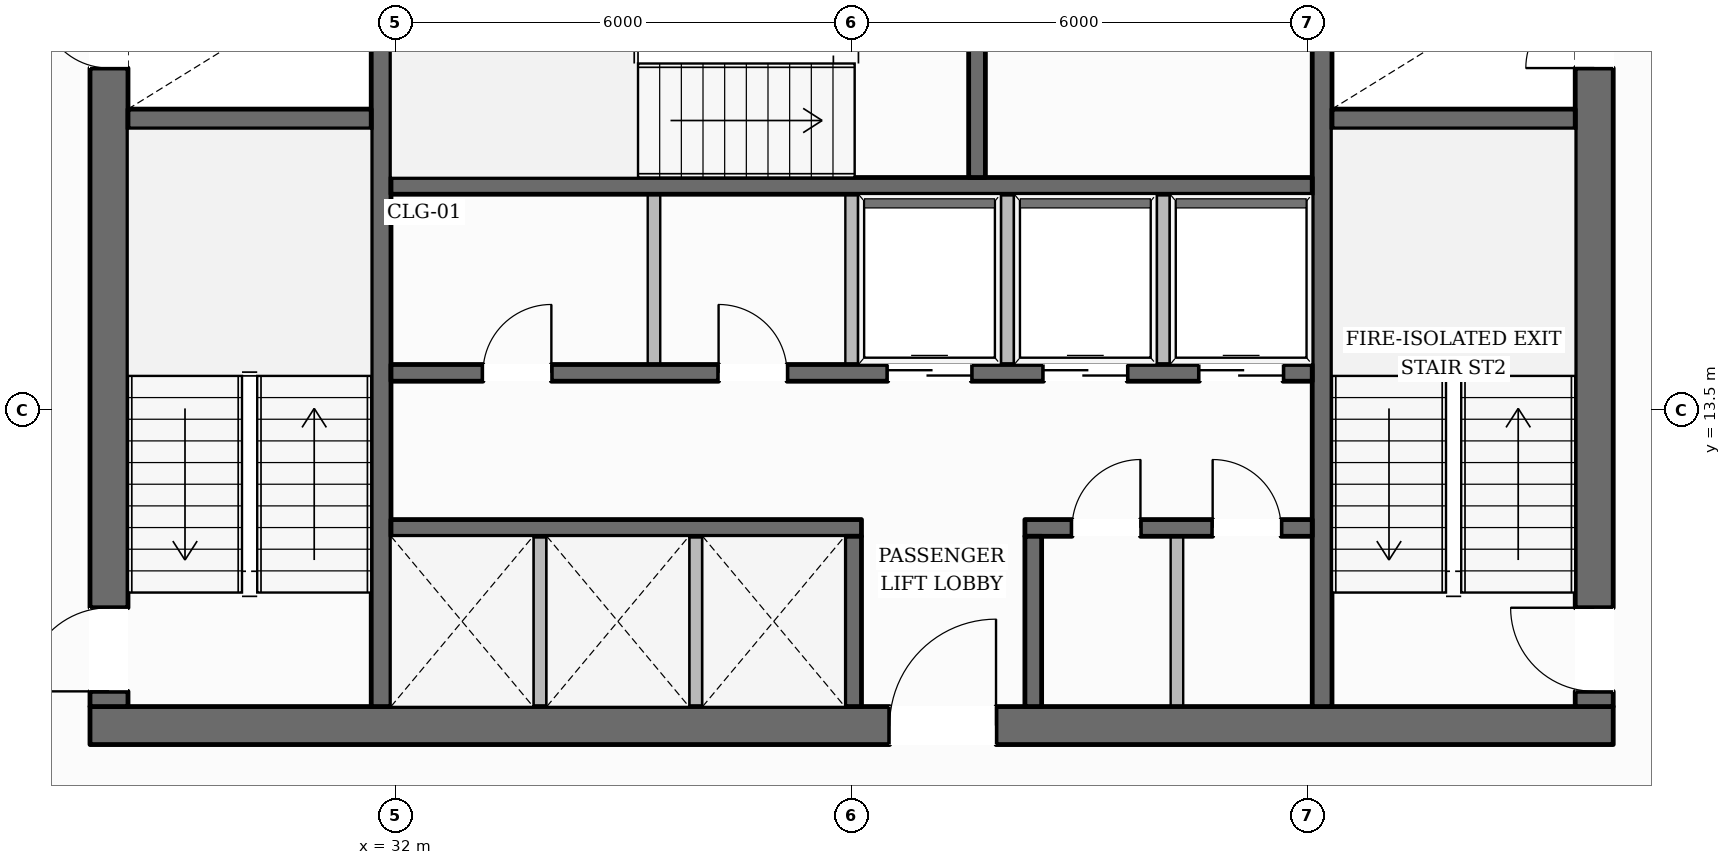
"""IFC4 building model, lengths in metres.
Left out: names, types, materials, properties, quantities, classifications, styles, units other than length and angle.
Written with IfcOpenShell. Run it as: python <this file> out.ifc"""

import sys

from ifc_helpers import new_model, si_unit, direction, frame, frame_2d, origin, place, context, subcontext, project, spatial, rectangle, extrude, element, fill, save


model = new_model("IFC4")
c1 = context("Model", 3, precision=1e-05, world=origin(), true_north=direction((0.0, 1.0)))
c2 = subcontext(c1, "Body", "Model", "MODEL_VIEW")
j1 = project(units=[si_unit("LENGTHUNIT", "METRE"), si_unit("PLANEANGLEUNIT", "RADIAN")], contexts=[c1])
p1 = place(None, origin())
s1 = spatial("IfcSite", under=j1, at=p1, CompositionType="ELEMENT")
p2 = place(p1, origin())
s2 = spatial("IfcBuilding", under=s1, at=p2, CompositionType="ELEMENT")
p3 = place(p2, frame((0.0, 0.0, 124.0)))
s3 = spatial("IfcBuildingStorey", under=s2, at=p3, CompositionType="ELEMENT", Elevation=124.0)
p4 = place(p3, frame((27.98, 9.35, 0.0), z_axis=(0.0, 0.0, 1.0), x_axis=(1.0, 0.0, 0.0)))
e1 = element("IfcWall", 1, at=p4, inside=s3, PredefinedType="SOLIDWALL", context=c2, shape_type="SweptSolid", body=[
    extrude(rectangle(XDim=20.04, YDim=0.5, at=frame_2d((10.02, 0.0))), origin(), (0.0, 0.0, 1.0), 3.6),
])
p5 = place(p4, frame((10.52, 0.0, 0.0)))
e2 = element("IfcOpeningElement", 2, at=p5, cuts=e1, PredefinedType="OPENING", context=c2, shape_type="SweptSolid", body=[
    extrude(rectangle(XDim=1.4, YDim=2.2, at=frame_2d((0.7, 1.1))), frame((0.0, 0.26, 0.0), z_axis=(0.0, -1.0, 0.0), x_axis=(1.0, 0.0, 0.0)), (0.0, 0.0, 1.0), 0.52),
])
p6 = place(p3, frame((28.23, 9.6, 0.0), z_axis=(0.0, 0.0, 1.0), x_axis=(0.0, 1.0, 0.0)))
e3 = element("IfcWall", 3, at=p6, inside=s3, PredefinedType="SOLIDWALL", context=c2, shape_type="SweptSolid", body=[
    extrude(rectangle(XDim=13.0, YDim=0.5, at=frame_2d((6.5, 0.0))), origin(), (0.0, 0.0, 1.0), 3.6),
])
p7 = place(p6, frame((0.2, 0.0, 0.0)))
e4 = element("IfcOpeningElement", 4, at=p7, cuts=e3, PredefinedType="OPENING", context=c2, shape_type="SweptSolid", body=[
    extrude(rectangle(XDim=1.1, YDim=2.15, at=frame_2d((0.55, 1.075))), frame((0.0, 0.26, 0.0), z_axis=(0.0, -1.0, 0.0), x_axis=(1.0, 0.0, 0.0)), (0.0, 0.0, 1.0), 0.52),
])
p8 = place(p6, frame((8.4, 0.0, 0.0)))
e5 = element("IfcOpeningElement", 5, at=p8, cuts=e3, PredefinedType="OPENING", context=c2, shape_type="SweptSolid", body=[
    extrude(rectangle(XDim=0.9, YDim=2.1, at=frame_2d((0.45, 1.05))), frame((0.0, 0.26, 0.0), z_axis=(0.0, -1.0, 0.0), x_axis=(1.0, 0.0, 0.0)), (0.0, 0.0, 1.0), 0.52),
])
p9 = place(p3, frame((47.77, 9.6, 0.0), z_axis=(0.0, 0.0, 1.0), x_axis=(0.0, 1.0, 0.0)))
e6 = element("IfcWall", 6, at=p9, inside=s3, PredefinedType="SOLIDWALL", context=c2, shape_type="SweptSolid", body=[
    extrude(rectangle(XDim=13.0, YDim=0.5, at=frame_2d((6.5, 0.0))), origin(), (0.0, 0.0, 1.0), 3.6),
])
p10 = place(p9, frame((0.2, 0.0, 0.0)))
e7 = element("IfcOpeningElement", 7, at=p10, cuts=e6, PredefinedType="OPENING", context=c2, shape_type="SweptSolid", body=[
    extrude(rectangle(XDim=1.1, YDim=2.15, at=frame_2d((0.55, 1.075))), frame((0.0, 0.26, 0.0), z_axis=(0.0, -1.0, 0.0), x_axis=(1.0, 0.0, 0.0)), (0.0, 0.0, 1.0), 0.52),
])
p11 = place(p9, frame((8.4, 0.0, 0.0)))
e8 = element("IfcOpeningElement", 8, at=p11, cuts=e6, PredefinedType="OPENING", context=c2, shape_type="SweptSolid", body=[
    extrude(rectangle(XDim=0.9, YDim=2.1, at=frame_2d((0.45, 1.05))), frame((0.0, 0.26, 0.0), z_axis=(0.0, -1.0, 0.0), x_axis=(1.0, 0.0, 0.0)), (0.0, 0.0, 1.0), 0.52),
])
p12 = place(p3, frame((31.81, 9.6, 0.0), z_axis=(0.0, 0.0, 1.0), x_axis=(0.0, 1.0, 0.0)))
e9 = element("IfcWall", 9, at=p12, inside=s3, PredefinedType="SHEAR", context=c2, shape_type="SweptSolid", body=[
    extrude(rectangle(XDim=13.0, YDim=0.26, at=frame_2d((6.5, 0.0))), origin(), (0.0, 0.0, 1.0), 3.6),
])
p13 = place(p12, frame((10.925, 0.0, 0.0)))
e10 = element("IfcOpeningElement", 10, at=p13, cuts=e9, PredefinedType="OPENING", context=c2, shape_type="SweptSolid", body=[
    extrude(rectangle(XDim=1.25, YDim=2.25, at=frame_2d((0.625, 1.125))), frame((0.0, 0.14, 0.0), z_axis=(0.0, -1.0, 0.0), x_axis=(1.0, 0.0, 0.0)), (0.0, 0.0, 1.0), 0.28),
])
p14 = place(p3, frame((44.19, 9.6, 0.0), z_axis=(0.0, 0.0, 1.0), x_axis=(0.0, 1.0, 0.0)))
e11 = element("IfcWall", 11, at=p14, inside=s3, PredefinedType="SHEAR", context=c2, shape_type="SweptSolid", body=[
    extrude(rectangle(XDim=13.0, YDim=0.26, at=frame_2d((6.5, 0.0))), origin(), (0.0, 0.0, 1.0), 3.6),
])
p15 = place(p14, frame((10.925, 0.0, 0.0)))
e12 = element("IfcOpeningElement", 12, at=p15, cuts=e11, PredefinedType="OPENING", context=c2, shape_type="SweptSolid", body=[
    extrude(rectangle(XDim=1.25, YDim=2.25, at=frame_2d((0.625, 1.125))), frame((0.0, 0.14, 0.0), z_axis=(0.0, -1.0, 0.0), x_axis=(1.0, 0.0, 0.0)), (0.0, 0.0, 1.0), 0.28),
])
for number, where, z_axis, x_axis in (
    (13, (28.48, 17.33, 0.0), (0.0, 0.0, 1.0), (1.0, 0.0, 0.0)),
    (14, (44.32, 17.33, 0.0), (0.0, 0.0, 1.0), (1.0, 0.0, 0.0)),
):
    element("IfcWall", number, at=place(p3, frame(where, z_axis=z_axis, x_axis=x_axis)), inside=s3, PredefinedType="SHEAR", context=c2, shape_type="SweptSolid", body=[
        extrude(rectangle(XDim=3.2, YDim=0.26, at=frame_2d((1.6, 0.0))), origin(), (0.0, 0.0, 1.0), 3.6),
    ])
p16 = place(p3, frame((31.94, 16.45, 0.0), z_axis=(0.0, 0.0, 1.0), x_axis=(1.0, 0.0, 0.0)))
e15 = element("IfcWall", 15, at=p16, inside=s3, PredefinedType="SOLIDWALL", context=c2, shape_type="SweptSolid", body=[
    extrude(rectangle(XDim=12.12, YDim=0.22, at=frame_2d((6.06, 0.0))), origin(), (0.0, 0.0, 1.0), 3.6),
])
p17 = place(p3, frame((39.65, 16.56, 0.0), z_axis=(0.0, 0.0, 1.0), x_axis=(0.0, 1.0, 0.0)))
e16 = element("IfcWall", 16, at=p17, inside=s3, PredefinedType="SOLIDWALL", context=c2, shape_type="SweptSolid", body=[
    extrude(rectangle(XDim=3.2, YDim=0.22, at=frame_2d((1.6, 0.0))), origin(), (0.0, 0.0, 1.0), 3.6),
])
p18 = place(p3, frame((31.94, 13.99, 0.0), z_axis=(0.0, 0.0, 1.0), x_axis=(1.0, 0.0, 0.0)))
e17 = element("IfcWall", 17, at=p18, inside=s3, PredefinedType="SOLIDWALL", context=c2, shape_type="SweptSolid", body=[
    extrude(rectangle(XDim=12.12, YDim=0.22, at=frame_2d((6.06, 0.0))), origin(), (0.0, 0.0, 1.0), 3.6),
])
p19 = place(p18, frame((1.21, 0.0, 0.0)))
e18 = element("IfcOpeningElement", 18, at=p19, cuts=e17, PredefinedType="OPENING", context=c2, shape_type="SweptSolid", body=[
    extrude(rectangle(XDim=0.9, YDim=2.1, at=frame_2d((0.45, 1.05))), frame((0.0, 0.12, 0.0), z_axis=(0.0, -1.0, 0.0), x_axis=(1.0, 0.0, 0.0)), (0.0, 0.0, 1.0), 0.24),
])
p20 = place(p18, frame((4.31, 0.0, 0.0)))
e19 = element("IfcOpeningElement", 19, at=p20, cuts=e17, PredefinedType="OPENING", context=c2, shape_type="SweptSolid", body=[
    extrude(rectangle(XDim=0.9, YDim=2.1, at=frame_2d((0.45, 1.05))), frame((0.0, 0.12, 0.0), z_axis=(0.0, -1.0, 0.0), x_axis=(1.0, 0.0, 0.0)), (0.0, 0.0, 1.0), 0.24),
])
p21 = place(p18, frame((6.535, 0.0, 0.0)))
e20 = element("IfcOpeningElement", 20, at=p21, cuts=e17, PredefinedType="OPENING", context=c2, shape_type="SweptSolid", body=[
    extrude(rectangle(XDim=1.1, YDim=2.2, at=frame_2d((0.55, 1.1))), frame((0.0, 0.12, 0.0), z_axis=(0.0, -1.0, 0.0), x_axis=(1.0, 0.0, 0.0)), (0.0, 0.0, 1.0), 0.24),
])
p22 = place(p18, frame((8.585, 0.0, 0.0)))
e21 = element("IfcOpeningElement", 21, at=p22, cuts=e17, PredefinedType="OPENING", context=c2, shape_type="SweptSolid", body=[
    extrude(rectangle(XDim=1.1, YDim=2.2, at=frame_2d((0.55, 1.1))), frame((0.0, 0.12, 0.0), z_axis=(0.0, -1.0, 0.0), x_axis=(1.0, 0.0, 0.0)), (0.0, 0.0, 1.0), 0.24),
])
p23 = place(p18, frame((10.635, 0.0, 0.0)))
e22 = element("IfcOpeningElement", 22, at=p23, cuts=e17, PredefinedType="OPENING", context=c2, shape_type="SweptSolid", body=[
    extrude(rectangle(XDim=1.1, YDim=2.2, at=frame_2d((0.55, 1.1))), frame((0.0, 0.12, 0.0), z_axis=(0.0, -1.0, 0.0), x_axis=(1.0, 0.0, 0.0)), (0.0, 0.0, 1.0), 0.24),
])
p24 = place(p3, frame((31.94, 11.95, 0.0), z_axis=(0.0, 0.0, 1.0), x_axis=(1.0, 0.0, 0.0)))
e23 = element("IfcWall", 23, at=p24, inside=s3, PredefinedType="SOLIDWALL", context=c2, shape_type="SweptSolid", body=[
    extrude(rectangle(XDim=6.19, YDim=0.22, at=frame_2d((3.095, 0.0))), origin(), (0.0, 0.0, 1.0), 3.6),
])
p25 = place(p3, frame((40.28, 11.95, 0.0), z_axis=(0.0, 0.0, 1.0), x_axis=(1.0, 0.0, 0.0)))
e24 = element("IfcWall", 24, at=p25, inside=s3, PredefinedType="SOLIDWALL", context=c2, shape_type="SweptSolid", body=[
    extrude(rectangle(XDim=3.78, YDim=0.22, at=frame_2d((1.89, 0.0))), origin(), (0.0, 0.0, 1.0), 3.6),
])
p26 = place(p25, frame((0.62, 0.0, 0.0)))
e25 = element("IfcOpeningElement", 25, at=p26, cuts=e24, PredefinedType="OPENING", context=c2, shape_type="SweptSolid", body=[
    extrude(rectangle(XDim=0.9, YDim=2.1, at=frame_2d((0.45, 1.05))), frame((0.0, 0.12, 0.0), z_axis=(0.0, -1.0, 0.0), x_axis=(1.0, 0.0, 0.0)), (0.0, 0.0, 1.0), 0.24),
])
p27 = place(p25, frame((2.47, 0.0, 0.0)))
e26 = element("IfcOpeningElement", 26, at=p27, cuts=e24, PredefinedType="OPENING", context=c2, shape_type="SweptSolid", body=[
    extrude(rectangle(XDim=0.9, YDim=2.1, at=frame_2d((0.45, 1.05))), frame((0.0, 0.12, 0.0), z_axis=(0.0, -1.0, 0.0), x_axis=(1.0, 0.0, 0.0)), (0.0, 0.0, 1.0), 0.24),
])
for number, where, z_axis, x_axis in (
    (27, (38.02, 9.6, 0.0), (0.0, 0.0, 1.0), (0.0, 1.0, 0.0)),
    (28, (40.39, 9.6, 0.0), (0.0, 0.0, 1.0), (0.0, 1.0, 0.0)),
):
    element("IfcWall", number, at=place(p3, frame(where, z_axis=z_axis, x_axis=x_axis)), inside=s3, PredefinedType="SOLIDWALL", context=c2, shape_type="SweptSolid", body=[
        extrude(rectangle(XDim=2.24, YDim=0.22, at=frame_2d((1.12, 0.0))), origin(), (0.0, 0.0, 1.0), 3.6),
    ])
p28 = place(p3, frame((13.815, 12.649, 0.0), z_axis=(0.0, 0.0, 1.0), x_axis=(0.501718288841, 0.865031073801, 0.0)))
e29 = element("IfcWall", 29, at=p28, inside=s3, PredefinedType="STANDARD", context=c2, shape_type="SweptSolid", body=[
    extrude(rectangle(XDim=36.708, YDim=0.38, at=frame_2d((18.354, 0.0))), origin(), (0.0, 0.0, 1.0), 3.059),
])
p29 = place(p28, frame((32.476, 0.0, 0.65)))
e30 = element("IfcOpeningElement", 30, at=p29, cuts=e29, PredefinedType="OPENING", context=c2, shape_type="SweptSolid", body=[
    extrude(rectangle(XDim=1.55, YDim=1.75, at=frame_2d((0.775, 0.875))), frame((0.0, 0.2, 0.0), z_axis=(0.0, -1.0, 0.0), x_axis=(1.0, 0.0, 0.0)), (0.0, 0.0, 1.0), 0.4),
])
p30 = place(p28, frame((26.517, 0.0, 0.65)))
e31 = element("IfcOpeningElement", 31, at=p30, cuts=e29, PredefinedType="OPENING", context=c2, shape_type="SweptSolid", body=[
    extrude(rectangle(XDim=1.55, YDim=1.75, at=frame_2d((0.775, 0.875))), frame((0.0, 0.2, 0.0), z_axis=(0.0, -1.0, 0.0), x_axis=(1.0, 0.0, 0.0)), (0.0, 0.0, 1.0), 0.4),
])
p31 = place(p28, frame((14.601, 0.0, 0.65)))
e32 = element("IfcOpeningElement", 32, at=p31, cuts=e29, PredefinedType="OPENING", context=c2, shape_type="SweptSolid", body=[
    extrude(rectangle(XDim=1.55, YDim=1.75, at=frame_2d((0.775, 0.875))), frame((0.0, 0.2, 0.0), z_axis=(0.0, -1.0, 0.0), x_axis=(1.0, 0.0, 0.0)), (0.0, 0.0, 1.0), 0.4),
])
p32 = place(p28, frame((8.643, 0.0, 0.65)))
e33 = element("IfcOpeningElement", 33, at=p32, cuts=e29, PredefinedType="OPENING", context=c2, shape_type="SweptSolid", body=[
    extrude(rectangle(XDim=1.55, YDim=1.75, at=frame_2d((0.775, 0.875))), frame((0.0, 0.2, 0.0), z_axis=(0.0, -1.0, 0.0), x_axis=(1.0, 0.0, 0.0)), (0.0, 0.0, 1.0), 0.4),
])
p33 = place(p28, frame((2.684, 0.0, 0.65)))
e34 = element("IfcOpeningElement", 34, at=p33, cuts=e29, PredefinedType="OPENING", context=c2, shape_type="SweptSolid", body=[
    extrude(rectangle(XDim=1.55, YDim=1.75, at=frame_2d((0.775, 0.875))), frame((0.0, 0.2, 0.0), z_axis=(0.0, -1.0, 0.0), x_axis=(1.0, 0.0, 0.0)), (0.0, 0.0, 1.0), 0.4),
])
p34 = place(p3, frame((43.881, 44.336, 0.0), z_axis=(0.0, 0.0, 1.0), x_axis=(0.506335448268, -0.862336601234, 0.0)))
e35 = element("IfcWall", 35, at=p34, inside=s3, PredefinedType="STANDARD", context=c2, shape_type="SweptSolid", body=[
    extrude(rectangle(XDim=37.05, YDim=0.38, at=frame_2d((18.525, 0.0))), origin(), (0.0, 0.0, 1.0), 3.059),
])
p35 = place(p34, frame((32.786, 0.0, 0.65)))
e36 = element("IfcOpeningElement", 36, at=p35, cuts=e35, PredefinedType="OPENING", context=c2, shape_type="SweptSolid", body=[
    extrude(rectangle(XDim=1.55, YDim=1.75, at=frame_2d((0.775, 0.875))), frame((0.0, 0.2, 0.0), z_axis=(0.0, -1.0, 0.0), x_axis=(1.0, 0.0, 0.0)), (0.0, 0.0, 1.0), 0.4),
])
p36 = place(p34, frame((26.77, 0.0, 0.65)))
e37 = element("IfcOpeningElement", 37, at=p36, cuts=e35, PredefinedType="OPENING", context=c2, shape_type="SweptSolid", body=[
    extrude(rectangle(XDim=1.55, YDim=1.75, at=frame_2d((0.775, 0.875))), frame((0.0, 0.2, 0.0), z_axis=(0.0, -1.0, 0.0), x_axis=(1.0, 0.0, 0.0)), (0.0, 0.0, 1.0), 0.4),
])
p37 = place(p34, frame((14.738, 0.0, 0.65)))
e38 = element("IfcOpeningElement", 38, at=p37, cuts=e35, PredefinedType="OPENING", context=c2, shape_type="SweptSolid", body=[
    extrude(rectangle(XDim=1.55, YDim=1.75, at=frame_2d((0.775, 0.875))), frame((0.0, 0.2, 0.0), z_axis=(0.0, -1.0, 0.0), x_axis=(1.0, 0.0, 0.0)), (0.0, 0.0, 1.0), 0.4),
])
p38 = place(p34, frame((8.722, 0.0, 0.65)))
e39 = element("IfcOpeningElement", 39, at=p38, cuts=e35, PredefinedType="OPENING", context=c2, shape_type="SweptSolid", body=[
    extrude(rectangle(XDim=1.55, YDim=1.75, at=frame_2d((0.775, 0.875))), frame((0.0, 0.2, 0.0), z_axis=(0.0, -1.0, 0.0), x_axis=(1.0, 0.0, 0.0)), (0.0, 0.0, 1.0), 0.4),
])
p39 = place(p34, frame((2.706, 0.0, 0.65)))
e40 = element("IfcOpeningElement", 40, at=p39, cuts=e35, PredefinedType="OPENING", context=c2, shape_type="SweptSolid", body=[
    extrude(rectangle(XDim=1.55, YDim=1.75, at=frame_2d((0.775, 0.875))), frame((0.0, 0.2, 0.0), z_axis=(0.0, -1.0, 0.0), x_axis=(1.0, 0.0, 0.0)), (0.0, 0.0, 1.0), 0.4),
])
for number, where, z_axis, x_axis in (
    (41, (33.9, 9.55, 0.0), (0.0, 0.0, 1.0), (0.0, 1.0, 0.0)),
    (42, (35.95, 9.55, 0.0), (0.0, 0.0, 1.0), (0.0, 1.0, 0.0)),
):
    element("IfcWall", number, at=place(p3, frame(where, z_axis=z_axis, x_axis=x_axis)), inside=s3, PredefinedType="PARTITIONING", context=c2, shape_type="SweptSolid", body=[
        extrude(rectangle(XDim=2.29, YDim=0.165, at=frame_2d((1.145, 0.0))), origin(), (0.0, 0.0, 1.0), 3.6),
    ])
for number, where, z_axis, x_axis in (
    (43, (38.0, 14.1, 0.0), (0.0, 0.0, 1.0), (0.0, 1.0, 0.0)),
    (44, (35.4, 14.1, 0.0), (0.0, 0.0, 1.0), (0.0, 1.0, 0.0)),
    (45, (40.05, 14.1, 0.0), (0.0, 0.0, 1.0), (0.0, 1.0, 0.0)),
    (46, (42.1, 14.1, 0.0), (0.0, 0.0, 1.0), (0.0, 1.0, 0.0)),
):
    element("IfcWall", number, at=place(p3, frame(where, z_axis=z_axis, x_axis=x_axis)), inside=s3, PredefinedType="PARTITIONING", context=c2, shape_type="SweptSolid", body=[
        extrude(rectangle(XDim=2.24, YDim=0.165, at=frame_2d((1.12, 0.0))), origin(), (0.0, 0.0, 1.0), 3.6),
    ])
p40 = place(p3, frame((42.28, 9.55, 0.0), z_axis=(0.0, 0.0, 1.0), x_axis=(0.0, 1.0, 0.0)))
e47 = element("IfcWall", 47, at=p40, inside=s3, PredefinedType="PARTITIONING", context=c2, shape_type="SweptSolid", body=[
    extrude(rectangle(XDim=2.29, YDim=0.165, at=frame_2d((1.145, 0.0))), origin(), (0.0, 0.0, 1.0), 3.6),
])
p41 = place(p7, origin())
e48 = element("IfcDoor", 48, at=p41, inside=s3, OperationType="SINGLE_SWING_LEFT", PredefinedType="DOOR", context=c2, shape_type="SweptSolid", body=[
    extrude(rectangle(XDim=1.1, YDim=2.15, at=frame_2d((0.55, 1.075))), frame((0.0, 0.025, 0.0), z_axis=(0.0, -1.0, 0.0), x_axis=(1.0, 0.0, 0.0)), (0.0, 0.0, 1.0), 0.05),
])
fill(e4, e48)
p42 = place(p10, origin())
e49 = element("IfcDoor", 49, at=p42, inside=s3, OperationType="SINGLE_SWING_RIGHT", PredefinedType="DOOR", context=c2, shape_type="SweptSolid", body=[
    extrude(rectangle(XDim=1.1, YDim=2.15, at=frame_2d((0.55, 1.075))), frame((0.0, 0.025, 0.0), z_axis=(0.0, -1.0, 0.0), x_axis=(1.0, 0.0, 0.0)), (0.0, 0.0, 1.0), 0.05),
])
fill(e7, e49)
p43 = place(p8, origin())
e50 = element("IfcDoor", 50, at=p43, inside=s3, OperationType="SINGLE_SWING_RIGHT", PredefinedType="DOOR", context=c2, shape_type="SweptSolid", body=[
    extrude(rectangle(XDim=0.9, YDim=2.1, at=frame_2d((0.45, 1.05))), frame((0.0, 0.025, 0.0), z_axis=(0.0, -1.0, 0.0), x_axis=(1.0, 0.0, 0.0)), (0.0, 0.0, 1.0), 0.05),
])
fill(e5, e50)
p44 = place(p11, origin())
e51 = element("IfcDoor", 51, at=p44, inside=s3, OperationType="SINGLE_SWING_LEFT", PredefinedType="DOOR", context=c2, shape_type="SweptSolid", body=[
    extrude(rectangle(XDim=0.9, YDim=2.1, at=frame_2d((0.45, 1.05))), frame((0.0, 0.025, 0.0), z_axis=(0.0, -1.0, 0.0), x_axis=(1.0, 0.0, 0.0)), (0.0, 0.0, 1.0), 0.05),
])
fill(e8, e51)
p45 = place(p5, origin())
e52 = element("IfcDoor", 52, at=p45, inside=s3, OperationType="SINGLE_SWING_RIGHT", PredefinedType="DOOR", context=c2, shape_type="SweptSolid", body=[
    extrude(rectangle(XDim=1.4, YDim=2.2, at=frame_2d((0.7, 1.1))), frame((0.0, 0.025, 0.0), z_axis=(0.0, -1.0, 0.0), x_axis=(1.0, 0.0, 0.0)), (0.0, 0.0, 1.0), 0.05),
])
fill(e2, e52)
p46 = place(p19, origin())
e53 = element("IfcDoor", 53, at=p46, inside=s3, OperationType="SINGLE_SWING_RIGHT", PredefinedType="DOOR", context=c2, shape_type="SweptSolid", body=[
    extrude(rectangle(XDim=0.9, YDim=2.1, at=frame_2d((0.45, 1.05))), frame((0.0, 0.025, 0.0), z_axis=(0.0, -1.0, 0.0), x_axis=(1.0, 0.0, 0.0)), (0.0, 0.0, 1.0), 0.05),
])
fill(e18, e53)
p47 = place(p20, origin())
e54 = element("IfcDoor", 54, at=p47, inside=s3, OperationType="SINGLE_SWING_LEFT", PredefinedType="DOOR", context=c2, shape_type="SweptSolid", body=[
    extrude(rectangle(XDim=0.9, YDim=2.1, at=frame_2d((0.45, 1.05))), frame((0.0, 0.025, 0.0), z_axis=(0.0, -1.0, 0.0), x_axis=(1.0, 0.0, 0.0)), (0.0, 0.0, 1.0), 0.05),
])
fill(e19, e54)
p48 = place(p21, origin())
e55 = element("IfcDoor", 55, at=p48, inside=s3, OperationType="DOUBLE_DOOR_SLIDING", PredefinedType="DOOR", context=c2, shape_type="SweptSolid", body=[
    extrude(rectangle(XDim=1.1, YDim=2.2, at=frame_2d((0.55, 1.1))), frame((0.0, 0.025, 0.0), z_axis=(0.0, -1.0, 0.0), x_axis=(1.0, 0.0, 0.0)), (0.0, 0.0, 1.0), 0.05),
])
fill(e20, e55)
p49 = place(p22, origin())
e56 = element("IfcDoor", 56, at=p49, inside=s3, OperationType="DOUBLE_DOOR_SLIDING", PredefinedType="DOOR", context=c2, shape_type="SweptSolid", body=[
    extrude(rectangle(XDim=1.1, YDim=2.2, at=frame_2d((0.55, 1.1))), frame((0.0, 0.025, 0.0), z_axis=(0.0, -1.0, 0.0), x_axis=(1.0, 0.0, 0.0)), (0.0, 0.0, 1.0), 0.05),
])
fill(e21, e56)
p50 = place(p23, origin())
e57 = element("IfcDoor", 57, at=p50, inside=s3, OperationType="DOUBLE_DOOR_SLIDING", PredefinedType="DOOR", context=c2, shape_type="SweptSolid", body=[
    extrude(rectangle(XDim=1.1, YDim=2.2, at=frame_2d((0.55, 1.1))), frame((0.0, 0.025, 0.0), z_axis=(0.0, -1.0, 0.0), x_axis=(1.0, 0.0, 0.0)), (0.0, 0.0, 1.0), 0.05),
])
fill(e22, e57)
p51 = place(p26, origin())
e58 = element("IfcDoor", 58, at=p51, inside=s3, OperationType="SINGLE_SWING_RIGHT", PredefinedType="DOOR", context=c2, shape_type="SweptSolid", body=[
    extrude(rectangle(XDim=0.9, YDim=2.1, at=frame_2d((0.45, 1.05))), frame((0.0, 0.025, 0.0), z_axis=(0.0, -1.0, 0.0), x_axis=(1.0, 0.0, 0.0)), (0.0, 0.0, 1.0), 0.05),
])
fill(e25, e58)
p52 = place(p27, origin())
e59 = element("IfcDoor", 59, at=p52, inside=s3, OperationType="SINGLE_SWING_LEFT", PredefinedType="DOOR", context=c2, shape_type="SweptSolid", body=[
    extrude(rectangle(XDim=0.9, YDim=2.1, at=frame_2d((0.45, 1.05))), frame((0.0, 0.025, 0.0), z_axis=(0.0, -1.0, 0.0), x_axis=(1.0, 0.0, 0.0)), (0.0, 0.0, 1.0), 0.05),
])
fill(e26, e59)
save(model, sys.argv[1])
